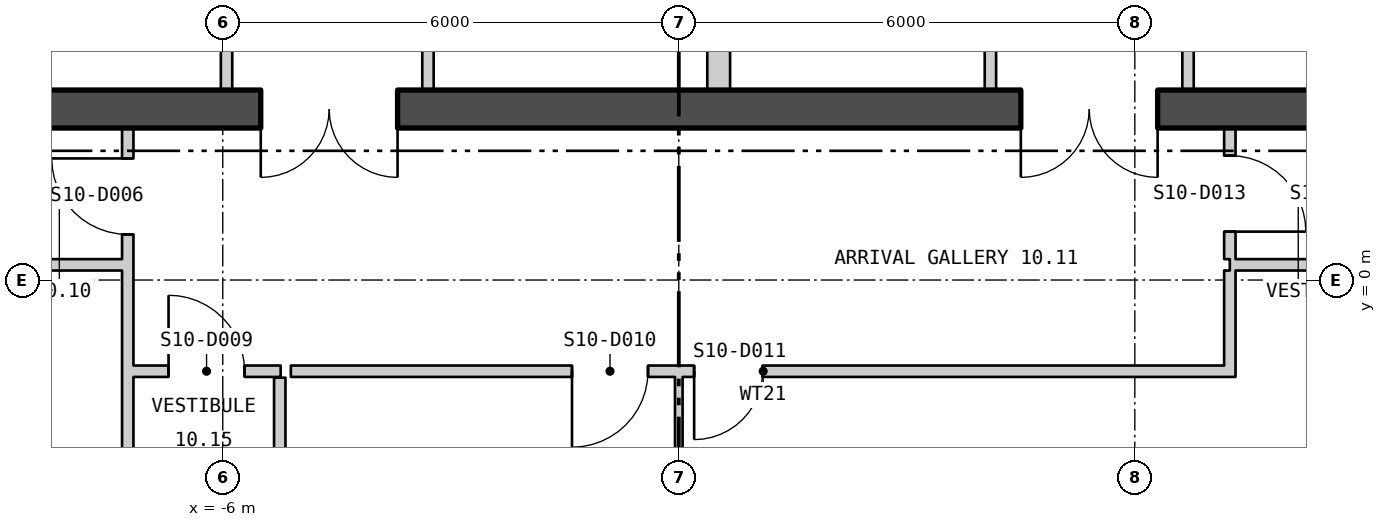
"""IFC4 building model, lengths in metres.
Left out: names, types, materials, properties, quantities, classifications, styles, units other than length and angle.
Written with IfcOpenShell. Run it as: python <this file> out.ifc"""

import sys

from ifc_helpers import new_model, si_unit, direction, frame, frame_2d, origin, place, context, subcontext, project, spatial, polyline, rectangle, outline, extrude, element, fill, save


model = new_model("IFC4")
c1 = context("Model", 3, precision=1e-05, world=origin(), true_north=direction((0.0, 1.0)))
c2 = subcontext(c1, "Body", "Model", "MODEL_VIEW")
j1 = project(units=[si_unit("LENGTHUNIT", "METRE"), si_unit("PLANEANGLEUNIT", "RADIAN")], contexts=[c1])
p1 = place(None, origin())
s1 = spatial("IfcSite", under=j1, at=p1, CompositionType="ELEMENT")
p2 = place(p1, origin())
s2 = spatial("IfcBuilding", under=s1, at=p2, CompositionType="ELEMENT")
p3 = place(p2, frame((0.0, 0.0, 139.8)))
s3 = spatial("IfcBuildingStorey", under=s2, at=p3, CompositionType="ELEMENT", Elevation=139.8)
p4 = place(p3, frame((-27.235, 12.423, -0.18), z_axis=(0.0, 0.0, 1.0), x_axis=(0.500000335318, -0.866025210188, 0.0)))
e1 = element("IfcWall", 1, at=p4, inside=s3, PredefinedType="SOLIDWALL", context=c2, shape_type="SweptSolid", body=[
    extrude(outline(polyline([(-0.13, -0.225), (45.88, -0.225), (45.62, 0.225), (0.13, 0.225), (-0.13, -0.225)])), origin(), (0.0, 0.0, 1.0), 3.68),
])
p5 = place(p4, frame((1.425, 0.0, 1.08)))
e2 = element("IfcOpeningElement", 2, at=p5, cuts=e1, PredefinedType="OPENING", context=c2, shape_type="SweptSolid", body=[
    extrude(rectangle(XDim=2.4, YDim=2.0, at=frame_2d((1.2, 1.0))), frame((0.0, 0.235, 0.0), z_axis=(0.0, -1.0, 0.0), x_axis=(1.0, 0.0, 0.0)), (0.0, 0.0, 1.0), 0.47),
])
p6 = place(p4, frame((5.895, 0.0, 1.08)))
e3 = element("IfcOpeningElement", 3, at=p6, cuts=e1, PredefinedType="OPENING", context=c2, shape_type="SweptSolid", body=[
    extrude(rectangle(XDim=2.4, YDim=2.0, at=frame_2d((1.2, 1.0))), frame((0.0, 0.235, 0.0), z_axis=(0.0, -1.0, 0.0), x_axis=(1.0, 0.0, 0.0)), (0.0, 0.0, 1.0), 0.47),
])
p7 = place(p4, frame((10.403, 0.0, 1.08)))
e4 = element("IfcOpeningElement", 4, at=p7, cuts=e1, PredefinedType="OPENING", context=c2, shape_type="SweptSolid", body=[
    extrude(rectangle(XDim=2.4, YDim=2.0, at=frame_2d((1.2, 1.0))), frame((0.0, 0.235, 0.0), z_axis=(0.0, -1.0, 0.0), x_axis=(1.0, 0.0, 0.0)), (0.0, 0.0, 1.0), 0.47),
])
p8 = place(p4, frame((14.912, 0.0, 1.08)))
e5 = element("IfcOpeningElement", 5, at=p8, cuts=e1, PredefinedType="OPENING", context=c2, shape_type="SweptSolid", body=[
    extrude(rectangle(XDim=2.4, YDim=2.0, at=frame_2d((1.2, 1.0))), frame((0.0, 0.235, 0.0), z_axis=(0.0, -1.0, 0.0), x_axis=(1.0, 0.0, 0.0)), (0.0, 0.0, 1.0), 0.47),
])
p9 = place(p4, frame((19.421, 0.0, 1.08)))
e6 = element("IfcOpeningElement", 6, at=p9, cuts=e1, PredefinedType="OPENING", context=c2, shape_type="SweptSolid", body=[
    extrude(rectangle(XDim=2.4, YDim=2.0, at=frame_2d((1.2, 1.0))), frame((0.0, 0.235, 0.0), z_axis=(0.0, -1.0, 0.0), x_axis=(1.0, 0.0, 0.0)), (0.0, 0.0, 1.0), 0.47),
])
p10 = place(p4, frame((23.929, 0.0, 1.08)))
e7 = element("IfcOpeningElement", 7, at=p10, cuts=e1, PredefinedType="OPENING", context=c2, shape_type="SweptSolid", body=[
    extrude(rectangle(XDim=2.4, YDim=2.0, at=frame_2d((1.2, 1.0))), frame((0.0, 0.235, 0.0), z_axis=(0.0, -1.0, 0.0), x_axis=(1.0, 0.0, 0.0)), (0.0, 0.0, 1.0), 0.47),
])
p11 = place(p4, frame((28.438, 0.0, 1.08)))
e8 = element("IfcOpeningElement", 8, at=p11, cuts=e1, PredefinedType="OPENING", context=c2, shape_type="SweptSolid", body=[
    extrude(rectangle(XDim=2.4, YDim=2.0, at=frame_2d((1.2, 1.0))), frame((0.0, 0.235, 0.0), z_axis=(0.0, -1.0, 0.0), x_axis=(1.0, 0.0, 0.0)), (0.0, 0.0, 1.0), 0.47),
])
p12 = place(p4, frame((32.947, 0.0, 1.08)))
e9 = element("IfcOpeningElement", 9, at=p12, cuts=e1, PredefinedType="OPENING", context=c2, shape_type="SweptSolid", body=[
    extrude(rectangle(XDim=2.4, YDim=2.0, at=frame_2d((1.2, 1.0))), frame((0.0, 0.235, 0.0), z_axis=(0.0, -1.0, 0.0), x_axis=(1.0, 0.0, 0.0)), (0.0, 0.0, 1.0), 0.47),
])
p13 = place(p4, frame((37.455, 0.0, 1.08)))
e10 = element("IfcOpeningElement", 10, at=p13, cuts=e1, PredefinedType="OPENING", context=c2, shape_type="SweptSolid", body=[
    extrude(rectangle(XDim=2.4, YDim=2.0, at=frame_2d((1.2, 1.0))), frame((0.0, 0.235, 0.0), z_axis=(0.0, -1.0, 0.0), x_axis=(1.0, 0.0, 0.0)), (0.0, 0.0, 1.0), 0.47),
])
p14 = place(p4, frame((41.925, 0.0, 1.08)))
e11 = element("IfcOpeningElement", 11, at=p14, cuts=e1, PredefinedType="OPENING", context=c2, shape_type="SweptSolid", body=[
    extrude(rectangle(XDim=2.4, YDim=2.0, at=frame_2d((1.2, 1.0))), frame((0.0, 0.235, 0.0), z_axis=(0.0, -1.0, 0.0), x_axis=(1.0, 0.0, 0.0)), (0.0, 0.0, 1.0), 0.47),
])
p15 = place(p3, frame((4.36, -27.198, -0.18), z_axis=(0.0, 0.0, 1.0), x_axis=(0.500000335318, 0.866025210188, 0.0)))
e12 = element("IfcWall", 12, at=p15, inside=s3, PredefinedType="SOLIDWALL", context=c2, shape_type="SweptSolid", body=[
    extrude(outline(polyline([(-0.13, -0.225), (45.88, -0.225), (45.62, 0.225), (0.13, 0.225), (-0.13, -0.225)])), origin(), (0.0, 0.0, 1.0), 3.68),
])
p16 = place(p15, frame((1.425, 0.0, 1.08)))
e13 = element("IfcOpeningElement", 13, at=p16, cuts=e12, PredefinedType="OPENING", context=c2, shape_type="SweptSolid", body=[
    extrude(rectangle(XDim=2.4, YDim=2.0, at=frame_2d((1.2, 1.0))), frame((0.0, 0.235, 0.0), z_axis=(0.0, -1.0, 0.0), x_axis=(1.0, 0.0, 0.0)), (0.0, 0.0, 1.0), 0.47),
])
p17 = place(p15, frame((5.895, 0.0, 1.08)))
e14 = element("IfcOpeningElement", 14, at=p17, cuts=e12, PredefinedType="OPENING", context=c2, shape_type="SweptSolid", body=[
    extrude(rectangle(XDim=2.4, YDim=2.0, at=frame_2d((1.2, 1.0))), frame((0.0, 0.235, 0.0), z_axis=(0.0, -1.0, 0.0), x_axis=(1.0, 0.0, 0.0)), (0.0, 0.0, 1.0), 0.47),
])
p18 = place(p15, frame((10.403, 0.0, 1.08)))
e15 = element("IfcOpeningElement", 15, at=p18, cuts=e12, PredefinedType="OPENING", context=c2, shape_type="SweptSolid", body=[
    extrude(rectangle(XDim=2.4, YDim=2.0, at=frame_2d((1.2, 1.0))), frame((0.0, 0.235, 0.0), z_axis=(0.0, -1.0, 0.0), x_axis=(1.0, 0.0, 0.0)), (0.0, 0.0, 1.0), 0.47),
])
p19 = place(p15, frame((14.912, 0.0, 1.08)))
e16 = element("IfcOpeningElement", 16, at=p19, cuts=e12, PredefinedType="OPENING", context=c2, shape_type="SweptSolid", body=[
    extrude(rectangle(XDim=2.4, YDim=2.0, at=frame_2d((1.2, 1.0))), frame((0.0, 0.235, 0.0), z_axis=(0.0, -1.0, 0.0), x_axis=(1.0, 0.0, 0.0)), (0.0, 0.0, 1.0), 0.47),
])
p20 = place(p15, frame((19.421, 0.0, 1.08)))
e17 = element("IfcOpeningElement", 17, at=p20, cuts=e12, PredefinedType="OPENING", context=c2, shape_type="SweptSolid", body=[
    extrude(rectangle(XDim=2.4, YDim=2.0, at=frame_2d((1.2, 1.0))), frame((0.0, 0.235, 0.0), z_axis=(0.0, -1.0, 0.0), x_axis=(1.0, 0.0, 0.0)), (0.0, 0.0, 1.0), 0.47),
])
p21 = place(p15, frame((23.929, 0.0, 1.08)))
e18 = element("IfcOpeningElement", 18, at=p21, cuts=e12, PredefinedType="OPENING", context=c2, shape_type="SweptSolid", body=[
    extrude(rectangle(XDim=2.4, YDim=2.0, at=frame_2d((1.2, 1.0))), frame((0.0, 0.235, 0.0), z_axis=(0.0, -1.0, 0.0), x_axis=(1.0, 0.0, 0.0)), (0.0, 0.0, 1.0), 0.47),
])
p22 = place(p15, frame((37.455, 0.0, 1.08)))
e19 = element("IfcOpeningElement", 19, at=p22, cuts=e12, PredefinedType="OPENING", context=c2, shape_type="SweptSolid", body=[
    extrude(rectangle(XDim=2.4, YDim=2.0, at=frame_2d((1.2, 1.0))), frame((0.0, 0.235, 0.0), z_axis=(0.0, -1.0, 0.0), x_axis=(1.0, 0.0, 0.0)), (0.0, 0.0, 1.0), 0.47),
])
p23 = place(p15, frame((41.925, 0.0, 1.08)))
e20 = element("IfcOpeningElement", 20, at=p23, cuts=e12, PredefinedType="OPENING", context=c2, shape_type="SweptSolid", body=[
    extrude(rectangle(XDim=2.4, YDim=2.0, at=frame_2d((1.2, 1.0))), frame((0.0, 0.235, 0.0), z_axis=(0.0, -1.0, 0.0), x_axis=(1.0, 0.0, 0.0)), (0.0, 0.0, 1.0), 0.47),
])
p24 = place(p3, frame((-16.2, 2.25, 0.0), z_axis=(0.0, 0.0, 1.0), x_axis=(1.0, 0.0, 0.0)))
e21 = element("IfcWall", 21, at=p24, inside=s3, PredefinedType="SHEAR", context=c2, shape_type="SweptSolid", body=[
    extrude(rectangle(XDim=32.4, YDim=0.5, at=frame_2d((16.2, 0.0))), origin(), (0.0, 0.0, 1.0), 3.7),
])
p25 = place(p24, frame((10.7, 0.0, 0.0)))
e22 = element("IfcOpeningElement", 22, at=p25, cuts=e21, PredefinedType="OPENING", context=c2, shape_type="SweptSolid", body=[
    extrude(rectangle(XDim=1.8, YDim=2.4, at=frame_2d((0.9, 1.2))), frame((0.0, 0.26, 0.0), z_axis=(0.0, -1.0, 0.0), x_axis=(1.0, 0.0, 0.0)), (0.0, 0.0, 1.0), 0.52),
])
p26 = place(p24, frame((20.7, 0.0, 0.0)))
e23 = element("IfcOpeningElement", 23, at=p26, cuts=e21, PredefinedType="OPENING", context=c2, shape_type="SweptSolid", body=[
    extrude(rectangle(XDim=1.8, YDim=2.4, at=frame_2d((0.9, 1.2))), frame((0.0, 0.26, 0.0), z_axis=(0.0, -1.0, 0.0), x_axis=(1.0, 0.0, 0.0)), (0.0, 0.0, 1.0), 0.52),
])
p27 = place(p3, frame((-5.95, 2.5, 0.0), z_axis=(0.0, 0.0, 1.0), x_axis=(0.0, 1.0, 0.0)))
e24 = element("IfcWall", 24, at=p27, inside=s3, PredefinedType="PARTITIONING", context=c2, shape_type="SweptSolid", body=[
    extrude(rectangle(XDim=2.975, YDim=0.15, at=frame_2d((1.488, 0.0))), origin(), (0.0, 0.0, 1.0), 3.7),
])
for number, where, z_axis, x_axis in (
    (25, (-3.3, 2.5, 0.0), (0.0, 0.0, 1.0), (0.0, 1.0, 0.0)),
    (26, (0.45, 2.5, 0.0), (0.0, 0.0, 1.0), (0.0, 1.0, 0.0)),
    (27, (0.6, 2.5, 0.0), (0.0, 0.0, 1.0), (0.0, 1.0, 0.0)),
    (28, (4.1, 2.5, 0.0), (0.0, 0.0, 1.0), (0.0, 1.0, 0.0)),
    (29, (6.7, 2.5, 0.0), (0.0, 0.0, 1.0), (0.0, 1.0, 0.0)),
):
    element("IfcWall", number, at=place(p3, frame(where, z_axis=z_axis, x_axis=x_axis)), inside=s3, PredefinedType="PARTITIONING", context=c2, shape_type="SweptSolid", body=[
        extrude(rectangle(XDim=3.575, YDim=0.15, at=frame_2d((1.788, 0.0))), origin(), (0.0, 0.0, 1.0), 3.7),
    ])
p28 = place(p3, frame((-17.925, 0.2, 0.0), z_axis=(0.0, 0.0, 1.0), x_axis=(1.0, 0.0, 0.0)))
e30 = element("IfcWall", 30, at=p28, inside=s3, PredefinedType="PARTITIONING", context=c2, shape_type="SweptSolid", body=[
    extrude(rectangle(XDim=10.6, YDim=0.15, at=frame_2d((5.3, 0.0))), origin(), (0.0, 0.0, 1.0), 3.7),
])
p29 = place(p3, frame((-7.25, -3.46, 0.0), z_axis=(0.0, 0.0, 1.0), x_axis=(0.0, 1.0, 0.0)))
e31 = element("IfcWall", 31, at=p29, inside=s3, PredefinedType="PARTITIONING", context=c2, shape_type="SweptSolid", body=[
    extrude(rectangle(XDim=5.46, YDim=0.15, at=frame_2d((2.73, 0.0))), origin(), (0.0, 0.0, 1.0), 3.7),
])
p30 = place(p29, frame((4.06, 0.0, 0.0)))
e32 = element("IfcOpeningElement", 32, at=p30, cuts=e31, PredefinedType="OPENING", context=c2, shape_type="SweptSolid", body=[
    extrude(rectangle(XDim=1.0, YDim=2.1, at=frame_2d((0.5, 1.05))), frame((0.0, 0.085, 0.0), z_axis=(0.0, -1.0, 0.0), x_axis=(1.0, 0.0, 0.0)), (0.0, 0.0, 1.0), 0.17),
])
p31 = place(p3, frame((-7.175, -1.2, 0.0), z_axis=(0.0, 0.0, 1.0), x_axis=(1.0, 0.0, 0.0)))
e33 = element("IfcWall", 33, at=p31, inside=s3, PredefinedType="PARTITIONING", context=c2, shape_type="SweptSolid", body=[
    extrude(rectangle(XDim=1.937, YDim=0.15, at=frame_2d((0.969, 0.0))), origin(), (0.0, 0.0, 1.0), 3.7),
])
p32 = place(p31, frame((0.462, 0.0, 0.0)))
e34 = element("IfcOpeningElement", 34, at=p32, cuts=e33, PredefinedType="OPENING", context=c2, shape_type="SweptSolid", body=[
    extrude(rectangle(XDim=1.0, YDim=2.1, at=frame_2d((0.5, 1.05))), frame((0.0, 0.085, 0.0), z_axis=(0.0, -1.0, 0.0), x_axis=(1.0, 0.0, 0.0)), (0.0, 0.0, 1.0), 0.17),
])
p33 = place(p3, frame((-5.25, -3.48, 0.0), z_axis=(0.0, 0.0, 1.0), x_axis=(0.0, 1.0, 0.0)))
e35 = element("IfcWall", 35, at=p33, inside=s3, PredefinedType="PARTITIONING", context=c2, shape_type="SweptSolid", body=[
    extrude(rectangle(XDim=2.195, YDim=0.15, at=frame_2d((1.097, 0.0))), origin(), (0.0, 0.0, 1.0), 3.7),
])
p34 = place(p3, frame((-5.104, -1.2, 0.0), z_axis=(0.0, 0.0, 1.0), x_axis=(1.0, 0.0, 0.0)))
e36 = element("IfcWall", 36, at=p34, inside=s3, PredefinedType="PARTITIONING", context=c2, shape_type="SweptSolid", body=[
    extrude(rectangle(XDim=12.429, YDim=0.15, at=frame_2d((6.215, 0.0))), origin(), (0.0, 0.0, 1.0), 3.7),
])
p35 = place(p34, frame((3.699, 0.0, 0.0)))
e37 = element("IfcOpeningElement", 37, at=p35, cuts=e36, PredefinedType="OPENING", context=c2, shape_type="SweptSolid", body=[
    extrude(rectangle(XDim=1.0, YDim=2.1, at=frame_2d((0.5, 1.05))), frame((0.0, 0.085, 0.0), z_axis=(0.0, -1.0, 0.0), x_axis=(1.0, 0.0, 0.0)), (0.0, 0.0, 1.0), 0.17),
])
p36 = place(p34, frame((5.306, 0.0, 0.0)))
e38 = element("IfcOpeningElement", 38, at=p36, cuts=e36, PredefinedType="OPENING", context=c2, shape_type="SweptSolid", body=[
    extrude(rectangle(XDim=0.9, YDim=2.1, at=frame_2d((0.45, 1.05))), frame((0.0, 0.085, 0.0), z_axis=(0.0, -1.0, 0.0), x_axis=(1.0, 0.0, 0.0)), (0.0, 0.0, 1.0), 0.17),
])
p37 = place(p3, frame((0.0, -3.099, 0.0), z_axis=(0.0, 0.0, 1.0), x_axis=(0.0, 1.0, 0.0)))
e39 = element("IfcWall", 39, at=p37, inside=s3, PredefinedType="PARTITIONING", context=c2, shape_type="SweptSolid", body=[
    extrude(rectangle(XDim=1.824, YDim=0.1, at=frame_2d((0.912, 0.0))), origin(), (0.0, 0.0, 1.0), 3.15),
])
p38 = place(p3, frame((7.25, -1.125, 0.0), z_axis=(0.0, 0.0, 1.0), x_axis=(0.0, 1.0, 0.0)))
e40 = element("IfcWall", 40, at=p38, inside=s3, PredefinedType="PARTITIONING", context=c2, shape_type="SweptSolid", body=[
    extrude(rectangle(XDim=1.25, YDim=0.15, at=frame_2d((0.625, 0.0))), origin(), (0.0, 0.0, 1.0), 3.7),
])
p39 = place(p3, frame((7.25, 0.2, 0.0), z_axis=(0.0, 0.0, 1.0), x_axis=(1.0, 0.0, 0.0)))
e41 = element("IfcWall", 41, at=p39, inside=s3, PredefinedType="PARTITIONING", context=c2, shape_type="SweptSolid", body=[
    extrude(rectangle(XDim=10.675, YDim=0.15, at=frame_2d((5.338, 0.0))), origin(), (0.0, 0.0, 1.0), 3.7),
])
p40 = place(p39, frame((6.75, 0.0, 0.0)))
e42 = element("IfcOpeningElement", 42, at=p40, cuts=e41, PredefinedType="OPENING", context=c2, shape_type="SweptSolid", body=[
    extrude(rectangle(XDim=1.0, YDim=2.1, at=frame_2d((0.5, 1.05))), frame((0.0, 0.085, 0.0), z_axis=(0.0, -1.0, 0.0), x_axis=(1.0, 0.0, 0.0)), (0.0, 0.0, 1.0), 0.17),
])
p41 = place(p3, frame((7.25, 0.275, 0.0), z_axis=(0.0, 0.0, 1.0), x_axis=(0.0, 1.0, 0.0)))
e43 = element("IfcWall", 43, at=p41, inside=s3, PredefinedType="PARTITIONING", context=c2, shape_type="SweptSolid", body=[
    extrude(rectangle(XDim=1.725, YDim=0.15, at=frame_2d((0.863, 0.0))), origin(), (0.0, 0.0, 1.0), 3.7),
])
p42 = place(p41, frame((0.362, 0.0, 0.0)))
e44 = element("IfcOpeningElement", 44, at=p42, cuts=e43, PredefinedType="OPENING", context=c2, shape_type="SweptSolid", body=[
    extrude(rectangle(XDim=1.0, YDim=2.1, at=frame_2d((0.5, 1.05))), frame((0.0, 0.085, 0.0), z_axis=(0.0, -1.0, 0.0), x_axis=(1.0, 0.0, 0.0)), (0.0, 0.0, 1.0), 0.17),
])
p43 = place(p25, origin())
e45 = element("IfcDoor", 45, at=p43, inside=s3, OperationType="DOUBLE_DOOR_SINGLE_SWING", PredefinedType="DOOR", context=c2, shape_type="SweptSolid", body=[
    extrude(rectangle(XDim=1.8, YDim=2.4, at=frame_2d((0.9, 1.2))), frame((0.0, 0.025, 0.0), z_axis=(0.0, -1.0, 0.0), x_axis=(1.0, 0.0, 0.0)), (0.0, 0.0, 1.0), 0.05),
])
fill(e22, e45)
p44 = place(p26, origin())
e46 = element("IfcDoor", 46, at=p44, inside=s3, OperationType="DOUBLE_DOOR_SINGLE_SWING", PredefinedType="DOOR", context=c2, shape_type="SweptSolid", body=[
    extrude(rectangle(XDim=1.8, YDim=2.4, at=frame_2d((0.9, 1.2))), frame((0.0, 0.025, 0.0), z_axis=(0.0, -1.0, 0.0), x_axis=(1.0, 0.0, 0.0)), (0.0, 0.0, 1.0), 0.05),
])
fill(e23, e46)
p45 = place(p30, origin())
e47 = element("IfcDoor", 47, at=p45, inside=s3, OperationType="SINGLE_SWING_LEFT", PredefinedType="DOOR", context=c2, shape_type="SweptSolid", body=[
    extrude(rectangle(XDim=1.0, YDim=2.1, at=frame_2d((0.5, 1.05))), frame((0.0, 0.025, 0.0), z_axis=(0.0, -1.0, 0.0), x_axis=(1.0, 0.0, 0.0)), (0.0, 0.0, 1.0), 0.05),
])
fill(e32, e47)
p46 = place(p32, origin())
e48 = element("IfcDoor", 48, at=p46, inside=s3, OperationType="SINGLE_SWING_RIGHT", PredefinedType="DOOR", context=c2, shape_type="SweptSolid", body=[
    extrude(rectangle(XDim=1.0, YDim=2.1, at=frame_2d((0.5, 1.05))), frame((0.0, 0.025, 0.0), z_axis=(0.0, -1.0, 0.0), x_axis=(1.0, 0.0, 0.0)), (0.0, 0.0, 1.0), 0.05),
])
fill(e34, e48)
p47 = place(p35, origin())
e49 = element("IfcDoor", 49, at=p47, inside=s3, OperationType="SINGLE_SWING_LEFT", PredefinedType="DOOR", context=c2, shape_type="SweptSolid", body=[
    extrude(rectangle(XDim=1.0, YDim=2.1, at=frame_2d((0.5, 1.05))), frame((0.0, 0.025, 0.0), z_axis=(0.0, -1.0, 0.0), x_axis=(1.0, 0.0, 0.0)), (0.0, 0.0, 1.0), 0.05),
])
fill(e37, e49)
p48 = place(p36, origin())
e50 = element("IfcDoor", 50, at=p48, inside=s3, OperationType="SINGLE_SWING_LEFT", PredefinedType="DOOR", context=c2, shape_type="SweptSolid", body=[
    extrude(rectangle(XDim=0.9, YDim=2.1, at=frame_2d((0.45, 1.05))), frame((0.0, 0.025, 0.0), z_axis=(0.0, -1.0, 0.0), x_axis=(1.0, 0.0, 0.0)), (0.0, 0.0, 1.0), 0.05),
])
fill(e38, e50)
p49 = place(p42, origin())
e51 = element("IfcDoor", 51, at=p49, inside=s3, OperationType="SINGLE_SWING_LEFT", PredefinedType="DOOR", context=c2, shape_type="SweptSolid", body=[
    extrude(rectangle(XDim=1.0, YDim=2.1, at=frame_2d((0.5, 1.05))), frame((0.0, 0.025, 0.0), z_axis=(0.0, -1.0, 0.0), x_axis=(1.0, 0.0, 0.0)), (0.0, 0.0, 1.0), 0.05),
])
fill(e44, e51)
save(model, sys.argv[1])
